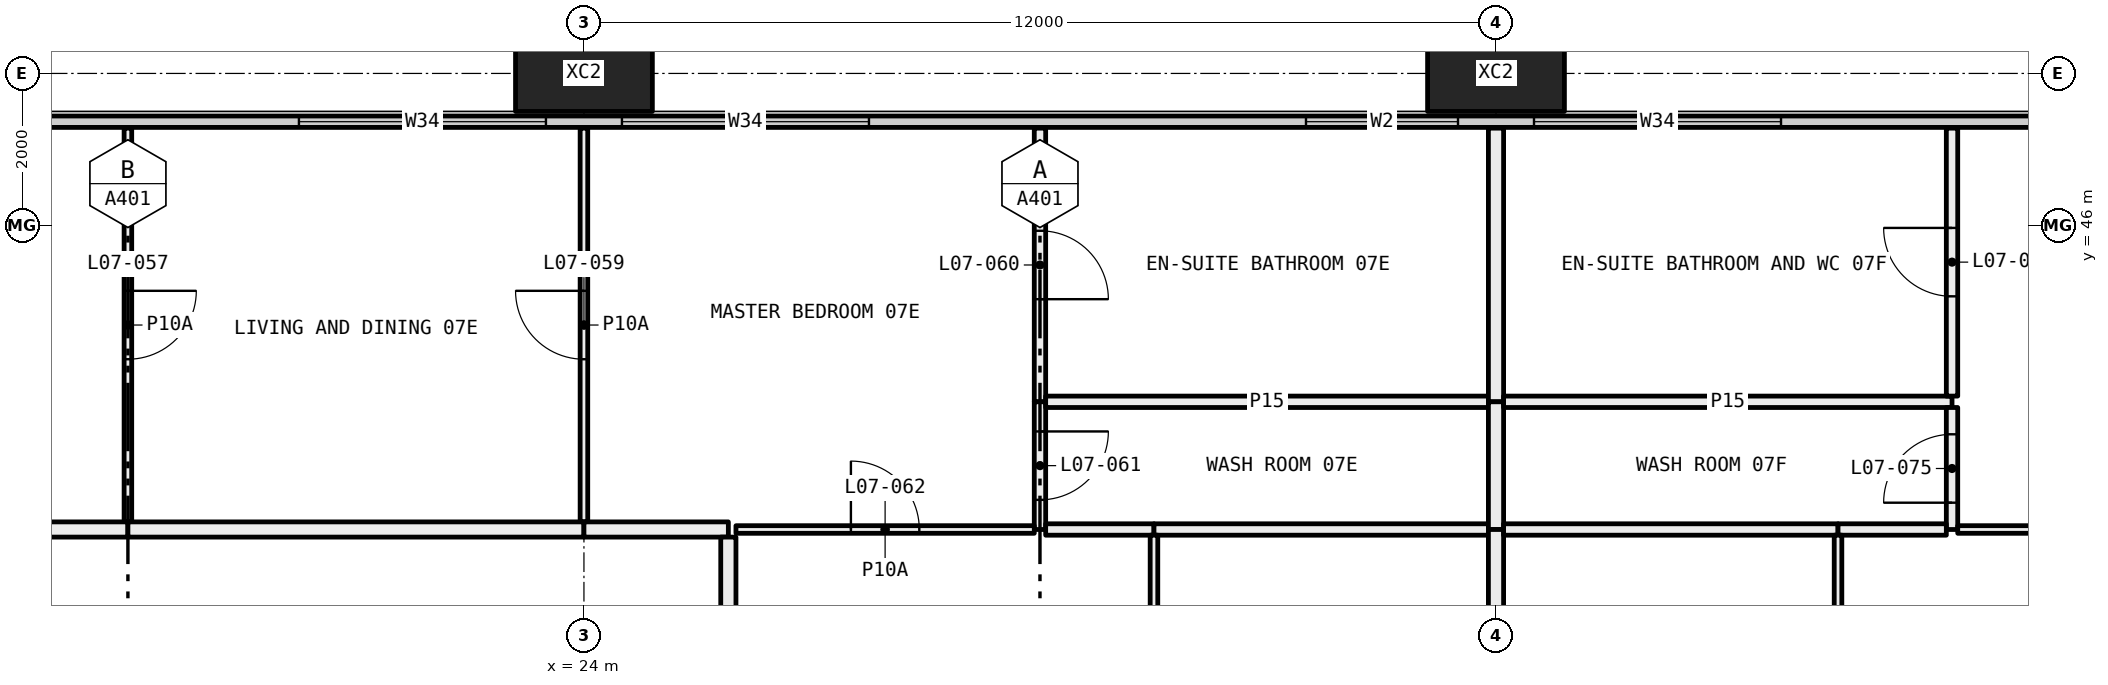
"""IFC4 building model, lengths in metres.
Left out: names, types, materials, properties, quantities, classifications, styles, units other than length and angle.
Written with IfcOpenShell. Run it as: python <this file> out.ifc"""

import sys

from ifc_helpers import new_model, si_unit, direction, frame, frame_2d, origin, origin_2d, place, context, subcontext, project, spatial, rectangle, hollow_rectangle, extrude, element, fill, save


model = new_model("IFC4")
c1 = context("Model", 3, precision=1e-05, world=origin(), true_north=direction((0.0, 1.0)))
c2 = subcontext(c1, "Body", "Model", "MODEL_VIEW")
j1 = project(units=[si_unit("LENGTHUNIT", "METRE"), si_unit("PLANEANGLEUNIT", "RADIAN")], contexts=[c1])
p1 = place(None, origin())
s1 = spatial("IfcSite", under=j1, at=p1, CompositionType="ELEMENT")
p2 = place(p1, origin())
s2 = spatial("IfcBuilding", under=s1, at=p2, CompositionType="ELEMENT")
p3 = place(p2, frame((0.0, 0.0, 36.9)))
s3 = spatial("IfcBuildingStorey", under=s2, at=p3, CompositionType="ELEMENT", Elevation=36.9)
for number, where, z_axis, x_axis in (
    (1, (24.0, 48.0, -0.4), (0.0, 0.0, 1.0), (1.0, 0.0, 0.0)),
    (2, (36.0, 48.0, -0.4), (0.0, 0.0, 1.0), (1.0, 0.0, 0.0)),
):
    element("IfcColumn", number, at=place(p3, frame(where, z_axis=z_axis, x_axis=x_axis)), inside=s3, PredefinedType="COLUMN", context=c2, shape_type="SweptSolid", body=[
        extrude(hollow_rectangle(XDim=1.8, YDim=1.0, WallThickness=0.07, at=origin_2d()), origin(), (0.0, 0.0, 1.0), 3.45),
    ])
p4 = place(p3, frame((6.56, 47.365, 0.0), z_axis=(0.0, 0.0, 1.0), x_axis=(1.0, 0.0, 0.0)))
e3 = element("IfcWall", 3, at=p4, inside=s3, PredefinedType="ELEMENTEDWALL", context=c2, shape_type="SweptSolid", body=[
    extrude(rectangle(XDim=58.88, YDim=0.15, at=frame_2d((29.44, 0.0))), origin(), (0.0, 0.0, 1.0), 3.05),
])
p5 = place(p4, frame((0.44, 0.0, 0.45)))
e4 = element("IfcOpeningElement", 4, at=p5, cuts=e3, PredefinedType="OPENING", context=c2, shape_type="SweptSolid", body=[
    extrude(rectangle(XDim=4.5, YDim=2.55, at=frame_2d((2.25, 1.275))), frame((0.0, 0.085, 0.0), z_axis=(0.0, -1.0, 0.0), x_axis=(1.0, 0.0, 0.0)), (0.0, 0.0, 1.0), 0.17),
])
p6 = place(p4, frame((5.94, 0.0, 0.45)))
e5 = element("IfcOpeningElement", 5, at=p6, cuts=e3, PredefinedType="OPENING", context=c2, shape_type="SweptSolid", body=[
    extrude(rectangle(XDim=3.25, YDim=2.55, at=frame_2d((1.625, 1.275))), frame((0.0, 0.085, 0.0), z_axis=(0.0, -1.0, 0.0), x_axis=(1.0, 0.0, 0.0)), (0.0, 0.0, 1.0), 0.17),
])
p7 = place(p4, frame((13.69, 0.0, 0.45)))
e6 = element("IfcOpeningElement", 6, at=p7, cuts=e3, PredefinedType="OPENING", context=c2, shape_type="SweptSolid", body=[
    extrude(rectangle(XDim=3.25, YDim=2.55, at=frame_2d((1.625, 1.275))), frame((0.0, 0.085, 0.0), z_axis=(0.0, -1.0, 0.0), x_axis=(1.0, 0.0, 0.0)), (0.0, 0.0, 1.0), 0.17),
])
p8 = place(p4, frame((17.94, 0.0, 0.45)))
e7 = element("IfcOpeningElement", 7, at=p8, cuts=e3, PredefinedType="OPENING", context=c2, shape_type="SweptSolid", body=[
    extrude(rectangle(XDim=3.25, YDim=2.55, at=frame_2d((1.625, 1.275))), frame((0.0, 0.085, 0.0), z_axis=(0.0, -1.0, 0.0), x_axis=(1.0, 0.0, 0.0)), (0.0, 0.0, 1.0), 0.17),
])
p9 = place(p4, frame((26.94, 0.0, 0.45)))
e8 = element("IfcOpeningElement", 8, at=p9, cuts=e3, PredefinedType="OPENING", context=c2, shape_type="SweptSolid", body=[
    extrude(rectangle(XDim=2.0, YDim=2.55, at=frame_2d((1.0, 1.275))), frame((0.0, 0.085, 0.0), z_axis=(0.0, -1.0, 0.0), x_axis=(1.0, 0.0, 0.0)), (0.0, 0.0, 1.0), 0.17),
])
p10 = place(p4, frame((29.94, 0.0, 0.45)))
e9 = element("IfcOpeningElement", 9, at=p10, cuts=e3, PredefinedType="OPENING", context=c2, shape_type="SweptSolid", body=[
    extrude(rectangle(XDim=3.25, YDim=2.55, at=frame_2d((1.625, 1.275))), frame((0.0, 0.085, 0.0), z_axis=(0.0, -1.0, 0.0), x_axis=(1.0, 0.0, 0.0)), (0.0, 0.0, 1.0), 0.17),
])
p11 = place(p4, frame((37.69, 0.0, 0.45)))
e10 = element("IfcOpeningElement", 10, at=p11, cuts=e3, PredefinedType="OPENING", context=c2, shape_type="SweptSolid", body=[
    extrude(rectangle(XDim=3.25, YDim=2.55, at=frame_2d((1.625, 1.275))), frame((0.0, 0.085, 0.0), z_axis=(0.0, -1.0, 0.0), x_axis=(1.0, 0.0, 0.0)), (0.0, 0.0, 1.0), 0.17),
])
p12 = place(p4, frame((41.94, 0.0, 0.45)))
e11 = element("IfcOpeningElement", 11, at=p12, cuts=e3, PredefinedType="OPENING", context=c2, shape_type="SweptSolid", body=[
    extrude(rectangle(XDim=3.25, YDim=2.55, at=frame_2d((1.625, 1.275))), frame((0.0, 0.085, 0.0), z_axis=(0.0, -1.0, 0.0), x_axis=(1.0, 0.0, 0.0)), (0.0, 0.0, 1.0), 0.17),
])
p13 = place(p4, frame((50.94, 0.0, 0.45)))
e12 = element("IfcOpeningElement", 12, at=p13, cuts=e3, PredefinedType="OPENING", context=c2, shape_type="SweptSolid", body=[
    extrude(rectangle(XDim=2.0, YDim=2.55, at=frame_2d((1.0, 1.275))), frame((0.0, 0.085, 0.0), z_axis=(0.0, -1.0, 0.0), x_axis=(1.0, 0.0, 0.0)), (0.0, 0.0, 1.0), 0.17),
])
p14 = place(p4, frame((53.94, 0.0, 0.45)))
e13 = element("IfcOpeningElement", 13, at=p14, cuts=e3, PredefinedType="OPENING", context=c2, shape_type="SweptSolid", body=[
    extrude(rectangle(XDim=4.5, YDim=2.55, at=frame_2d((2.25, 1.275))), frame((0.0, 0.085, 0.0), z_axis=(0.0, -1.0, 0.0), x_axis=(1.0, 0.0, 0.0)), (0.0, 0.0, 1.0), 0.17),
])
p15 = place(p3, frame((18.0, 42.1, 0.0), z_axis=(0.0, 0.0, 1.0), x_axis=(0.0, 1.0, 0.0)))
e14 = element("IfcWall", 14, at=p15, inside=s3, PredefinedType="PARTITIONING", context=c2, shape_type="SweptSolid", body=[
    extrude(rectangle(XDim=5.18, YDim=0.1, at=frame_2d((2.59, 0.0))), origin(), (0.0, 0.0, 1.0), 3.05),
])
p16 = place(p15, frame((2.14, 0.0, 0.0)))
e15 = element("IfcOpeningElement", 15, at=p16, cuts=e14, PredefinedType="OPENING", context=c2, shape_type="SweptSolid", body=[
    extrude(rectangle(XDim=0.9, YDim=2.1, at=frame_2d((0.45, 1.05))), frame((0.0, 0.06, 0.0), z_axis=(0.0, -1.0, 0.0), x_axis=(1.0, 0.0, 0.0)), (0.0, 0.0, 1.0), 0.12),
])
p17 = place(p3, frame((12.0, 42.0, 0.0), z_axis=(0.0, 0.0, 1.0), x_axis=(1.0, 0.0, 0.0)))
e16 = element("IfcWall", 16, at=p17, inside=s3, PredefinedType="PARTITIONING", context=c2, shape_type="SweptSolid", body=[
    extrude(rectangle(XDim=6.0, YDim=0.2, at=frame_2d((3.0, 0.0))), origin(), (0.0, 0.0, 1.0), 3.05),
])
p18 = place(p17, frame((2.5, 0.0, 0.0)))
e17 = element("IfcOpeningElement", 17, at=p18, cuts=e16, PredefinedType="OPENING", context=c2, shape_type="SweptSolid", body=[
    extrude(rectangle(XDim=1.0, YDim=2.1, at=frame_2d((0.5, 1.05))), frame((0.0, 0.11, 0.0), z_axis=(0.0, -1.0, 0.0), x_axis=(1.0, 0.0, 0.0)), (0.0, 0.0, 1.0), 0.22),
])
p19 = place(p3, frame((24.0, 42.1, 0.0), z_axis=(0.0, 0.0, 1.0), x_axis=(0.0, 1.0, 0.0)))
e18 = element("IfcWall", 18, at=p19, inside=s3, PredefinedType="PARTITIONING", context=c2, shape_type="SweptSolid", body=[
    extrude(rectangle(XDim=5.18, YDim=0.1, at=frame_2d((2.59, 0.0))), origin(), (0.0, 0.0, 1.0), 3.05),
])
p20 = place(p19, frame((2.14, 0.0, 0.0)))
e19 = element("IfcOpeningElement", 19, at=p20, cuts=e18, PredefinedType="OPENING", context=c2, shape_type="SweptSolid", body=[
    extrude(rectangle(XDim=0.9, YDim=2.1, at=frame_2d((0.45, 1.05))), frame((0.0, 0.06, 0.0), z_axis=(0.0, -1.0, 0.0), x_axis=(1.0, 0.0, 0.0)), (0.0, 0.0, 1.0), 0.12),
])
p21 = place(p3, frame((18.0, 42.0, 0.0), z_axis=(0.0, 0.0, 1.0), x_axis=(1.0, 0.0, 0.0)))
e20 = element("IfcWall", 20, at=p21, inside=s3, PredefinedType="PARTITIONING", context=c2, shape_type="SweptSolid", body=[
    extrude(rectangle(XDim=6.0, YDim=0.2, at=frame_2d((3.0, 0.0))), origin(), (0.0, 0.0, 1.0), 3.05),
])
p22 = place(p3, frame((30.0, 43.68, 0.0), z_axis=(0.0, 0.0, 1.0), x_axis=(0.0, 1.0, 0.0)))
e21 = element("IfcWall", 21, at=p22, inside=s3, PredefinedType="PARTITIONING", context=c2, shape_type="SweptSolid", body=[
    extrude(rectangle(XDim=3.6, YDim=0.15, at=frame_2d((1.8, 0.0))), origin(), (0.0, 0.0, 1.0), 3.05),
])
p23 = place(p22, frame((1.35, 0.0, 0.0)))
e22 = element("IfcOpeningElement", 22, at=p23, cuts=e21, PredefinedType="OPENING", context=c2, shape_type="SweptSolid", body=[
    extrude(rectangle(XDim=0.9, YDim=2.1, at=frame_2d((0.45, 1.05))), frame((0.0, 0.085, 0.0), z_axis=(0.0, -1.0, 0.0), x_axis=(1.0, 0.0, 0.0)), (0.0, 0.0, 1.0), 0.17),
])
p24 = place(p3, frame((30.0, 42.0, 0.0), z_axis=(0.0, 0.0, 1.0), x_axis=(0.0, 1.0, 0.0)))
e23 = element("IfcWall", 23, at=p24, inside=s3, PredefinedType="PARTITIONING", context=c2, shape_type="SweptSolid", body=[
    extrude(rectangle(XDim=1.68, YDim=0.15, at=frame_2d((0.84, 0.0))), origin(), (0.0, 0.0, 1.0), 3.05),
])
p25 = place(p24, frame((0.39, 0.0, 0.0)))
e24 = element("IfcOpeningElement", 24, at=p25, cuts=e23, PredefinedType="OPENING", context=c2, shape_type="SweptSolid", body=[
    extrude(rectangle(XDim=0.9, YDim=2.1, at=frame_2d((0.45, 1.05))), frame((0.0, 0.085, 0.0), z_axis=(0.0, -1.0, 0.0), x_axis=(1.0, 0.0, 0.0)), (0.0, 0.0, 1.0), 0.17),
])
p26 = place(p3, frame((26.0, 42.0, 0.0), z_axis=(0.0, 0.0, 1.0), x_axis=(1.0, 0.0, 0.0)))
e25 = element("IfcWall", 25, at=p26, inside=s3, PredefinedType="PARTITIONING", context=c2, shape_type="SweptSolid", body=[
    extrude(rectangle(XDim=3.925, YDim=0.1, at=frame_2d((1.962, 0.0))), origin(), (0.0, 0.0, 1.0), 3.05),
])
p27 = place(p26, frame((1.512, 0.0, 0.0)))
e26 = element("IfcOpeningElement", 26, at=p27, cuts=e25, PredefinedType="OPENING", context=c2, shape_type="SweptSolid", body=[
    extrude(rectangle(XDim=0.9, YDim=2.1, at=frame_2d((0.45, 1.05))), frame((0.0, 0.06, 0.0), z_axis=(0.0, -1.0, 0.0), x_axis=(1.0, 0.0, 0.0)), (0.0, 0.0, 1.0), 0.12),
])
p28 = place(p3, frame((24.0, 42.0, 0.0), z_axis=(0.0, 0.0, 1.0), x_axis=(1.0, 0.0, 0.0)))
e27 = element("IfcWall", 27, at=p28, inside=s3, PredefinedType="PARTITIONING", context=c2, shape_type="SweptSolid", body=[
    extrude(rectangle(XDim=1.9, YDim=0.2, at=frame_2d((0.95, 0.0))), origin(), (0.0, 0.0, 1.0), 3.05),
])
p29 = place(p3, frame((30.075, 43.68, 0.0), z_axis=(0.0, 0.0, 1.0), x_axis=(1.0, 0.0, 0.0)))
e28 = element("IfcWall", 28, at=p29, inside=s3, PredefinedType="PARTITIONING", context=c2, shape_type="SweptSolid", body=[
    extrude(rectangle(XDim=5.825, YDim=0.15, at=frame_2d((2.913, 0.0))), origin(), (0.0, 0.0, 1.0), 3.05),
])
p30 = place(p3, frame((36.0, 43.68, 0.0), z_axis=(0.0, 0.0, 1.0), x_axis=(0.0, 1.0, 0.0)))
e29 = element("IfcWall", 29, at=p30, inside=s3, PredefinedType="PARTITIONING", context=c2, shape_type="SweptSolid", body=[
    extrude(rectangle(XDim=3.6, YDim=0.2, at=frame_2d((1.8, 0.0))), origin(), (0.0, 0.0, 1.0), 2.45),
])
p31 = place(p3, frame((30.075, 42.0, 0.0), z_axis=(0.0, 0.0, 1.0), x_axis=(1.0, 0.0, 0.0)))
e30 = element("IfcWall", 30, at=p31, inside=s3, PredefinedType="PARTITIONING", context=c2, shape_type="SweptSolid", body=[
    extrude(rectangle(XDim=1.425, YDim=0.15, at=frame_2d((0.712, 0.0))), origin(), (0.0, 0.0, 1.0), 3.05),
])
p32 = place(p3, frame((31.5, 42.0, 0.0), z_axis=(0.0, 0.0, 1.0), x_axis=(1.0, 0.0, 0.0)))
e31 = element("IfcWall", 31, at=p32, inside=s3, PredefinedType="PARTITIONING", context=c2, shape_type="SweptSolid", body=[
    extrude(rectangle(XDim=4.4, YDim=0.15, at=frame_2d((2.2, 0.0))), origin(), (0.0, 0.0, 1.0), 3.05),
])
p33 = place(p3, frame((36.0, 42.0, 0.0), z_axis=(0.0, 0.0, 1.0), x_axis=(0.0, 1.0, 0.0)))
e32 = element("IfcWall", 32, at=p33, inside=s3, PredefinedType="PARTITIONING", context=c2, shape_type="SweptSolid", body=[
    extrude(rectangle(XDim=1.68, YDim=0.2, at=frame_2d((0.84, 0.0))), origin(), (0.0, 0.0, 1.0), 2.45),
])
p34 = place(p3, frame((31.5, 36.1, 0.0), z_axis=(0.0, 0.0, 1.0), x_axis=(0.0, 1.0, 0.0)))
e33 = element("IfcWall", 33, at=p34, inside=s3, PredefinedType="PARTITIONING", context=c2, shape_type="SweptSolid", body=[
    extrude(rectangle(XDim=5.825, YDim=0.1, at=frame_2d((2.913, 0.0))), origin(), (0.0, 0.0, 1.0), 3.05),
])
p35 = place(p34, frame((2.462, 0.0, 0.0)))
e34 = element("IfcOpeningElement", 34, at=p35, cuts=e33, PredefinedType="OPENING", context=c2, shape_type="SweptSolid", body=[
    extrude(rectangle(XDim=0.9, YDim=2.1, at=frame_2d((0.45, 1.05))), frame((0.0, 0.06, 0.0), z_axis=(0.0, -1.0, 0.0), x_axis=(1.0, 0.0, 0.0)), (0.0, 0.0, 1.0), 0.12),
])
p36 = place(p3, frame((25.9, 41.9, 0.0), z_axis=(0.0, 0.0, 1.0), x_axis=(0.0, -1.0, 0.0)))
e35 = element("IfcWall", 35, at=p36, inside=s3, PredefinedType="PARTITIONING", context=c2, shape_type="SweptSolid", body=[
    extrude(rectangle(XDim=6.2, YDim=0.2, at=frame_2d((3.1, 0.0))), origin(), (0.0, 0.0, 1.0), 2.45),
])
p37 = place(p3, frame((36.0, 36.8, 0.0), z_axis=(0.0, 0.0, 1.0), x_axis=(0.0, 1.0, 0.0)))
e36 = element("IfcWall", 36, at=p37, inside=s3, PredefinedType="PARTITIONING", context=c2, shape_type="SweptSolid", body=[
    extrude(rectangle(XDim=5.2, YDim=0.2, at=frame_2d((2.6, 0.0))), origin(), (0.0, 0.0, 1.0), 2.45),
])
p38 = place(p3, frame((36.1, 43.68, 0.0), z_axis=(0.0, 0.0, 1.0), x_axis=(1.0, 0.0, 0.0)))
e37 = element("IfcWall", 37, at=p38, inside=s3, PredefinedType="PARTITIONING", context=c2, shape_type="SweptSolid", body=[
    extrude(rectangle(XDim=5.9, YDim=0.15, at=frame_2d((2.95, 0.0))), origin(), (0.0, 0.0, 1.0), 3.05),
])
p39 = place(p3, frame((42.0, 43.755, 0.0), z_axis=(0.0, 0.0, 1.0), x_axis=(0.0, 1.0, 0.0)))
e38 = element("IfcWall", 38, at=p39, inside=s3, PredefinedType="PARTITIONING", context=c2, shape_type="SweptSolid", body=[
    extrude(rectangle(XDim=3.525, YDim=0.15, at=frame_2d((1.763, 0.0))), origin(), (0.0, 0.0, 1.0), 3.05),
])
p40 = place(p39, frame((1.312, 0.0, 0.0)))
e39 = element("IfcOpeningElement", 39, at=p40, cuts=e38, PredefinedType="OPENING", context=c2, shape_type="SweptSolid", body=[
    extrude(rectangle(XDim=0.9, YDim=2.1, at=frame_2d((0.45, 1.05))), frame((0.0, 0.085, 0.0), z_axis=(0.0, -1.0, 0.0), x_axis=(1.0, 0.0, 0.0)), (0.0, 0.0, 1.0), 0.17),
])
p41 = place(p3, frame((42.0, 42.0, 0.0), z_axis=(0.0, 0.0, 1.0), x_axis=(0.0, 1.0, 0.0)))
e40 = element("IfcWall", 40, at=p41, inside=s3, PredefinedType="PARTITIONING", context=c2, shape_type="SweptSolid", body=[
    extrude(rectangle(XDim=1.605, YDim=0.15, at=frame_2d((0.802, 0.0))), origin(), (0.0, 0.0, 1.0), 3.05),
])
p42 = place(p41, frame((0.353, 0.0, 0.0)))
e41 = element("IfcOpeningElement", 41, at=p42, cuts=e40, PredefinedType="OPENING", context=c2, shape_type="SweptSolid", body=[
    extrude(rectangle(XDim=0.9, YDim=2.1, at=frame_2d((0.45, 1.05))), frame((0.0, 0.085, 0.0), z_axis=(0.0, -1.0, 0.0), x_axis=(1.0, 0.0, 0.0)), (0.0, 0.0, 1.0), 0.17),
])
p43 = place(p3, frame((36.1, 42.0, 0.0), z_axis=(0.0, 0.0, 1.0), x_axis=(1.0, 0.0, 0.0)))
e42 = element("IfcWall", 42, at=p43, inside=s3, PredefinedType="PARTITIONING", context=c2, shape_type="SweptSolid", body=[
    extrude(rectangle(XDim=4.4, YDim=0.15, at=frame_2d((2.2, 0.0))), origin(), (0.0, 0.0, 1.0), 3.05),
])
p44 = place(p3, frame((40.5, 42.0, 0.0), z_axis=(0.0, 0.0, 1.0), x_axis=(1.0, 0.0, 0.0)))
e43 = element("IfcWall", 43, at=p44, inside=s3, PredefinedType="PARTITIONING", context=c2, shape_type="SweptSolid", body=[
    extrude(rectangle(XDim=1.425, YDim=0.15, at=frame_2d((0.712, 0.0))), origin(), (0.0, 0.0, 1.0), 3.05),
])
p45 = place(p3, frame((42.075, 42.0, 0.0), z_axis=(0.0, 0.0, 1.0), x_axis=(1.0, 0.0, 0.0)))
e44 = element("IfcWall", 44, at=p45, inside=s3, PredefinedType="PARTITIONING", context=c2, shape_type="SweptSolid", body=[
    extrude(rectangle(XDim=3.925, YDim=0.1, at=frame_2d((1.962, 0.0))), origin(), (0.0, 0.0, 1.0), 3.05),
])
p46 = place(p45, frame((1.512, 0.0, 0.0)))
e45 = element("IfcOpeningElement", 45, at=p46, cuts=e44, PredefinedType="OPENING", context=c2, shape_type="SweptSolid", body=[
    extrude(rectangle(XDim=0.9, YDim=2.1, at=frame_2d((0.45, 1.05))), frame((0.0, 0.06, 0.0), z_axis=(0.0, -1.0, 0.0), x_axis=(1.0, 0.0, 0.0)), (0.0, 0.0, 1.0), 0.12),
])
p47 = place(p3, frame((40.5, 36.1, 0.0), z_axis=(0.0, 0.0, 1.0), x_axis=(0.0, 1.0, 0.0)))
e46 = element("IfcWall", 46, at=p47, inside=s3, PredefinedType="PARTITIONING", context=c2, shape_type="SweptSolid", body=[
    extrude(rectangle(XDim=5.825, YDim=0.1, at=frame_2d((2.913, 0.0))), origin(), (0.0, 0.0, 1.0), 3.05),
])
p48 = place(p47, frame((2.462, 0.0, 0.0)))
e47 = element("IfcOpeningElement", 47, at=p48, cuts=e46, PredefinedType="OPENING", context=c2, shape_type="SweptSolid", body=[
    extrude(rectangle(XDim=0.9, YDim=2.1, at=frame_2d((0.45, 1.05))), frame((0.0, 0.06, 0.0), z_axis=(0.0, -1.0, 0.0), x_axis=(1.0, 0.0, 0.0)), (0.0, 0.0, 1.0), 0.12),
])
p49 = place(p7, origin())
e48 = element("IfcWindow", 48, at=p49, inside=s3, PartitioningType="SINGLE_PANEL", PredefinedType="WINDOW", context=c2, shape_type="SweptSolid", body=[
    extrude(rectangle(XDim=3.25, YDim=2.55, at=frame_2d((1.625, 1.275))), frame((0.0, 0.03, 0.0), z_axis=(0.0, -1.0, 0.0), x_axis=(1.0, 0.0, 0.0)), (0.0, 0.0, 1.0), 0.06),
])
fill(e6, e48)
p50 = place(p8, origin())
e49 = element("IfcWindow", 49, at=p50, inside=s3, PartitioningType="SINGLE_PANEL", PredefinedType="WINDOW", context=c2, shape_type="SweptSolid", body=[
    extrude(rectangle(XDim=3.25, YDim=2.55, at=frame_2d((1.625, 1.275))), frame((0.0, 0.03, 0.0), z_axis=(0.0, -1.0, 0.0), x_axis=(1.0, 0.0, 0.0)), (0.0, 0.0, 1.0), 0.06),
])
fill(e7, e49)
p51 = place(p9, origin())
e50 = element("IfcWindow", 50, at=p51, inside=s3, PartitioningType="SINGLE_PANEL", PredefinedType="WINDOW", context=c2, shape_type="SweptSolid", body=[
    extrude(rectangle(XDim=2.0, YDim=2.55, at=frame_2d((1.0, 1.275))), frame((0.0, 0.03, 0.0), z_axis=(0.0, -1.0, 0.0), x_axis=(1.0, 0.0, 0.0)), (0.0, 0.0, 1.0), 0.06),
])
fill(e8, e50)
p52 = place(p10, origin())
e51 = element("IfcWindow", 51, at=p52, inside=s3, PartitioningType="SINGLE_PANEL", PredefinedType="WINDOW", context=c2, shape_type="SweptSolid", body=[
    extrude(rectangle(XDim=3.25, YDim=2.55, at=frame_2d((1.625, 1.275))), frame((0.0, 0.03, 0.0), z_axis=(0.0, -1.0, 0.0), x_axis=(1.0, 0.0, 0.0)), (0.0, 0.0, 1.0), 0.06),
])
fill(e9, e51)
p53 = place(p16, frame((0.9, 0.0, 0.0), x_axis=(-1.0, 0.0, 0.0)))
e52 = element("IfcDoor", 52, at=p53, inside=s3, OperationType="SINGLE_SWING_RIGHT", PredefinedType="DOOR", context=c2, shape_type="SweptSolid", body=[
    extrude(rectangle(XDim=0.9, YDim=2.1, at=frame_2d((0.45, 1.05))), frame((0.0, 0.025, 0.0), z_axis=(0.0, -1.0, 0.0), x_axis=(1.0, 0.0, 0.0)), (0.0, 0.0, 1.0), 0.05),
])
fill(e15, e52)
p54 = place(p20, origin())
e53 = element("IfcDoor", 53, at=p54, inside=s3, OperationType="SINGLE_SWING_LEFT", PredefinedType="DOOR", context=c2, shape_type="SweptSolid", body=[
    extrude(rectangle(XDim=0.9, YDim=2.1, at=frame_2d((0.45, 1.05))), frame((0.0, 0.025, 0.0), z_axis=(0.0, -1.0, 0.0), x_axis=(1.0, 0.0, 0.0)), (0.0, 0.0, 1.0), 0.05),
])
fill(e19, e53)
p55 = place(p23, frame((0.9, 0.0, 0.0), x_axis=(-1.0, 0.0, 0.0)))
e54 = element("IfcDoor", 54, at=p55, inside=s3, OperationType="SINGLE_SWING_LEFT", PredefinedType="DOOR", context=c2, shape_type="SweptSolid", body=[
    extrude(rectangle(XDim=0.9, YDim=2.1, at=frame_2d((0.45, 1.05))), frame((0.0, 0.025, 0.0), z_axis=(0.0, -1.0, 0.0), x_axis=(1.0, 0.0, 0.0)), (0.0, 0.0, 1.0), 0.05),
])
fill(e22, e54)
p56 = place(p25, frame((0.9, 0.0, 0.0), x_axis=(-1.0, 0.0, 0.0)))
e55 = element("IfcDoor", 55, at=p56, inside=s3, OperationType="SINGLE_SWING_RIGHT", PredefinedType="DOOR", context=c2, shape_type="SweptSolid", body=[
    extrude(rectangle(XDim=0.9, YDim=2.1, at=frame_2d((0.45, 1.05))), frame((0.0, 0.025, 0.0), z_axis=(0.0, -1.0, 0.0), x_axis=(1.0, 0.0, 0.0)), (0.0, 0.0, 1.0), 0.05),
])
fill(e24, e55)
p57 = place(p27, origin())
e56 = element("IfcDoor", 56, at=p57, inside=s3, OperationType="SINGLE_SWING_RIGHT", PredefinedType="DOOR", context=c2, shape_type="SweptSolid", body=[
    extrude(rectangle(XDim=0.9, YDim=2.1, at=frame_2d((0.45, 1.05))), frame((0.0, 0.025, 0.0), z_axis=(0.0, -1.0, 0.0), x_axis=(1.0, 0.0, 0.0)), (0.0, 0.0, 1.0), 0.05),
])
fill(e26, e56)
p58 = place(p40, origin())
e57 = element("IfcDoor", 57, at=p58, inside=s3, OperationType="SINGLE_SWING_LEFT", PredefinedType="DOOR", context=c2, shape_type="SweptSolid", body=[
    extrude(rectangle(XDim=0.9, YDim=2.1, at=frame_2d((0.45, 1.05))), frame((0.0, 0.025, 0.0), z_axis=(0.0, -1.0, 0.0), x_axis=(1.0, 0.0, 0.0)), (0.0, 0.0, 1.0), 0.05),
])
fill(e39, e57)
p59 = place(p42, origin())
e58 = element("IfcDoor", 58, at=p59, inside=s3, OperationType="SINGLE_SWING_RIGHT", PredefinedType="DOOR", context=c2, shape_type="SweptSolid", body=[
    extrude(rectangle(XDim=0.9, YDim=2.1, at=frame_2d((0.45, 1.05))), frame((0.0, 0.025, 0.0), z_axis=(0.0, -1.0, 0.0), x_axis=(1.0, 0.0, 0.0)), (0.0, 0.0, 1.0), 0.05),
])
fill(e41, e58)
save(model, sys.argv[1])
